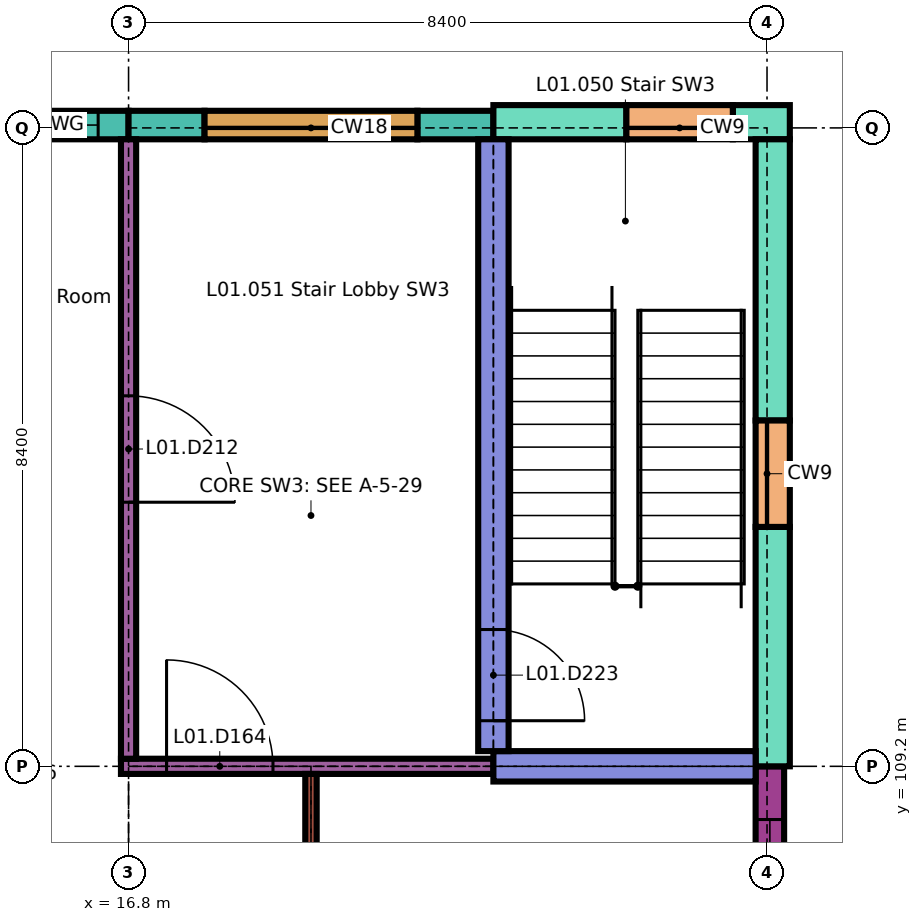
"""IFC4 building model, lengths in metres.
Left out: names, types, materials, properties, quantities, classifications, styles, units other than length and angle.
Written with IfcOpenShell. Run it as: python <this file> out.ifc"""

import sys

from ifc_helpers import new_model, si_unit, direction, frame, frame_2d, origin, place, context, subcontext, project, spatial, rectangle, extrude, element, fill, save


model = new_model("IFC4")
c1 = context("Model", 3, precision=1e-05, world=origin(), true_north=direction((0.0, 1.0)))
c2 = subcontext(c1, "Body", "Model", "MODEL_VIEW")
j1 = project(units=[si_unit("LENGTHUNIT", "METRE"), si_unit("PLANEANGLEUNIT", "RADIAN")], contexts=[c1])
p1 = place(None, origin())
s1 = spatial("IfcSite", under=j1, at=p1, CompositionType="ELEMENT")
p2 = place(p1, origin())
s2 = spatial("IfcBuilding", under=s1, at=p2, CompositionType="ELEMENT")
p3 = place(p2, frame((0.0, 0.0, 4.5)))
s3 = spatial("IfcBuildingStorey", under=s2, at=p3, CompositionType="ELEMENT", Elevation=4.5)
p4 = place(p3, frame((14.2, 117.637, 0.0), z_axis=(0.0, 0.0, 1.0), x_axis=(1.0, 0.0, 0.0)))
e1 = element("IfcWall", 1, at=p4, inside=s3, PredefinedType="SOLIDWALL", context=c2, shape_type="SweptSolid", body=[
    extrude(rectangle(XDim=2.6, YDim=0.375, at=frame_2d((1.3, 0.0))), origin(), (0.0, 0.0, 1.0), 3.45),
])
p5 = place(p4, frame((0.4, 0.0, 0.9)))
e2 = element("IfcOpeningElement", 2, at=p5, cuts=e1, PredefinedType="OPENING", context=c2, shape_type="SweptSolid", body=[
    extrude(rectangle(XDim=1.8, YDim=1.5, at=frame_2d((0.9, 0.75))), frame((0.0, 0.198, 0.0), z_axis=(0.0, -1.0, 0.0), x_axis=(1.0, 0.0, 0.0)), (0.0, 0.0, 1.0), 0.395),
])
for number, where, z_axis, x_axis in (
    (3, (16.8, 117.637, 0.0), (0.0, 0.0, 1.0), (1.0, 0.0, 0.0)),
    (4, (20.6, 117.637, 0.0), (0.0, 0.0, 1.0), (1.0, 0.0, 0.0)),
):
    element("IfcWall", number, at=place(p3, frame(where, z_axis=z_axis, x_axis=x_axis)), inside=s3, PredefinedType="SOLIDWALL", context=c2, shape_type="SweptSolid", body=[
        extrude(rectangle(XDim=1.0, YDim=0.375, at=frame_2d((0.5, 0.0))), origin(), (0.0, 0.0, 1.0), 3.45),
    ])
p6 = place(p3, frame((17.8, 117.637, 0.0), z_axis=(0.0, 0.0, 1.0), x_axis=(1.0, 0.0, 0.0)))
e5 = element("IfcWall", 5, at=p6, inside=s3, PredefinedType="SOLIDWALL", context=c2, shape_type="SweptSolid", body=[
    extrude(rectangle(XDim=2.8, YDim=0.375, at=frame_2d((1.4, 0.0))), origin(), (0.0, 0.0, 1.0), 0.6),
])
p7 = place(p3, frame((21.6, 117.675, 0.0), z_axis=(0.0, 0.0, 1.0), x_axis=(1.0, 0.0, 0.0)))
e6 = element("IfcWall", 6, at=p7, inside=s3, PredefinedType="SOLIDWALL", context=c2, shape_type="SweptSolid", body=[
    extrude(rectangle(XDim=1.75, YDim=0.45, at=frame_2d((0.875, 0.0))), origin(), (0.0, 0.0, 1.0), 3.45),
])
p8 = place(p3, frame((24.75, 117.675, 0.0), z_axis=(0.0, 0.0, 1.0), x_axis=(1.0, 0.0, 0.0)))
e7 = element("IfcWall", 7, at=p8, inside=s3, PredefinedType="SOLIDWALL", context=c2, shape_type="SweptSolid", body=[
    extrude(rectangle(XDim=0.75, YDim=0.45, at=frame_2d((0.375, 0.0))), origin(), (0.0, 0.0, 1.0), 3.45),
])
p9 = place(p3, frame((23.35, 117.675, 0.0), z_axis=(0.0, 0.0, 1.0), x_axis=(1.0, 0.0, 0.0)))
e8 = element("IfcWall", 8, at=p9, inside=s3, PredefinedType="SOLIDWALL", context=c2, shape_type="SweptSolid", body=[
    extrude(rectangle(XDim=1.4, YDim=0.45, at=frame_2d((0.7, 0.0))), origin(), (0.0, 0.0, 1.0), 0.6),
])
p10 = place(p3, frame((25.238, 105.0, 0.0), z_axis=(0.0, 0.0, 1.0), x_axis=(0.0, 1.0, 0.0)))
e9 = element("IfcWall", 9, at=p10, inside=s3, PredefinedType="SOLIDWALL", context=c2, shape_type="SweptSolid", body=[
    extrude(rectangle(XDim=4.2, YDim=0.375, at=frame_2d((2.1, 0.0))), origin(), (0.0, 0.0, 1.0), 3.15),
])
p11 = place(p10, frame((0.7, 0.0, 1.0)))
e10 = element("IfcOpeningElement", 10, at=p11, cuts=e9, PredefinedType="OPENING", context=c2, shape_type="SweptSolid", body=[
    extrude(rectangle(XDim=2.8, YDim=1.2, at=frame_2d((1.4, 0.6))), frame((0.0, 0.198, 0.0), z_axis=(0.0, -1.0, 0.0), x_axis=(1.0, 0.0, 0.0)), (0.0, 0.0, 1.0), 0.395),
])
p12 = place(p3, frame((25.275, 109.2, 0.0), z_axis=(0.0, 0.0, 1.0), x_axis=(0.0, 1.0, 0.0)))
e11 = element("IfcWall", 11, at=p12, inside=s3, PredefinedType="SOLIDWALL", context=c2, shape_type="SweptSolid", body=[
    extrude(rectangle(XDim=3.15, YDim=0.45, at=frame_2d((1.575, 0.0))), origin(), (0.0, 0.0, 1.0), 3.45),
])
p13 = place(p3, frame((25.275, 113.75, 0.0), z_axis=(0.0, 0.0, 1.0), x_axis=(0.0, 1.0, 0.0)))
e12 = element("IfcWall", 12, at=p13, inside=s3, PredefinedType="SOLIDWALL", context=c2, shape_type="SweptSolid", body=[
    extrude(rectangle(XDim=3.7, YDim=0.45, at=frame_2d((1.85, 0.0))), origin(), (0.0, 0.0, 1.0), 3.45),
])
p14 = place(p3, frame((25.275, 112.35, 0.0), z_axis=(0.0, 0.0, 1.0), x_axis=(0.0, 1.0, 0.0)))
e13 = element("IfcWall", 13, at=p14, inside=s3, PredefinedType="SOLIDWALL", context=c2, shape_type="SweptSolid", body=[
    extrude(rectangle(XDim=1.4, YDim=0.45, at=frame_2d((0.7, 0.0))), origin(), (0.0, 0.0, 1.0), 0.6),
])
p15 = place(p3, frame((16.7, 109.2, 0.0), z_axis=(0.0, 0.0, 1.0), x_axis=(1.0, 0.0, 0.0)))
e14 = element("IfcWall", 14, at=p15, inside=s3, PredefinedType="PARTITIONING", context=c2, shape_type="SweptSolid", body=[
    extrude(rectangle(XDim=4.9, YDim=0.2, at=frame_2d((2.45, 0.0))), origin(), (0.0, 0.0, 1.0), 3.45),
])
p16 = place(p15, frame((0.6, 0.0, 0.0)))
e15 = element("IfcOpeningElement", 15, at=p16, cuts=e14, PredefinedType="OPENING", context=c2, shape_type="SweptSolid", body=[
    extrude(rectangle(XDim=1.4, YDim=2.1, at=frame_2d((0.7, 1.05))), frame((0.0, 0.11, 0.0), z_axis=(0.0, -1.0, 0.0), x_axis=(1.0, 0.0, 0.0)), (0.0, 0.0, 1.0), 0.22),
])
p17 = place(p3, frame((21.6, 109.2, 0.0), z_axis=(0.0, 0.0, 1.0), x_axis=(1.0, 0.0, 0.0)))
e16 = element("IfcWall", 16, at=p17, inside=s3, PredefinedType="SHEAR", context=c2, shape_type="SweptSolid", body=[
    extrude(rectangle(XDim=3.45, YDim=0.4, at=frame_2d((1.725, 0.0))), origin(), (0.0, 0.0, 1.0), 3.45),
])
p18 = place(p3, frame((16.8, 109.3, 0.0), z_axis=(0.0, 0.0, 1.0), x_axis=(0.0, 1.0, 0.0)))
e17 = element("IfcWall", 17, at=p18, inside=s3, PredefinedType="PARTITIONING", context=c2, shape_type="SweptSolid", body=[
    extrude(rectangle(XDim=8.15, YDim=0.2, at=frame_2d((4.075, 0.0))), origin(), (0.0, 0.0, 1.0), 3.45),
])
p19 = place(p18, frame((3.375, 0.0, 0.0)))
e18 = element("IfcOpeningElement", 18, at=p19, cuts=e17, PredefinedType="OPENING", context=c2, shape_type="SweptSolid", body=[
    extrude(rectangle(XDim=1.4, YDim=2.1, at=frame_2d((0.7, 1.05))), frame((0.0, 0.11, 0.0), z_axis=(0.0, -1.0, 0.0), x_axis=(1.0, 0.0, 0.0)), (0.0, 0.0, 1.0), 0.22),
])
p20 = place(p3, frame((19.2, 92.488, 0.0), z_axis=(0.0, 0.0, 1.0), x_axis=(0.0, 1.0, 0.0)))
e19 = element("IfcWall", 19, at=p20, inside=s3, PredefinedType="PARTITIONING", context=c2, shape_type="SweptSolid", body=[
    extrude(rectangle(XDim=16.613, YDim=0.15, at=frame_2d((8.306, 0.0))), origin(), (0.0, 0.0, 1.0), 3.45),
])
p21 = place(p20, frame((3.656, 0.0, 0.0)))
e20 = element("IfcOpeningElement", 20, at=p21, cuts=e19, PredefinedType="OPENING", context=c2, shape_type="SweptSolid", body=[
    extrude(rectangle(XDim=1.0, YDim=2.1, at=frame_2d((0.5, 1.05))), frame((0.0, 0.085, 0.0), z_axis=(0.0, -1.0, 0.0), x_axis=(1.0, 0.0, 0.0)), (0.0, 0.0, 1.0), 0.17),
])
p22 = place(p20, frame((9.913, 0.0, 0.0)))
e21 = element("IfcOpeningElement", 21, at=p22, cuts=e19, PredefinedType="OPENING", context=c2, shape_type="SweptSolid", body=[
    extrude(rectangle(XDim=1.0, YDim=2.1, at=frame_2d((0.5, 1.05))), frame((0.0, 0.085, 0.0), z_axis=(0.0, -1.0, 0.0), x_axis=(1.0, 0.0, 0.0)), (0.0, 0.0, 1.0), 0.17),
])
p23 = place(p20, frame((14.062, 0.0, 0.0)))
e22 = element("IfcOpeningElement", 22, at=p23, cuts=e19, PredefinedType="OPENING", context=c2, shape_type="SweptSolid", body=[
    extrude(rectangle(XDim=1.0, YDim=2.1, at=frame_2d((0.5, 1.05))), frame((0.0, 0.085, 0.0), z_axis=(0.0, -1.0, 0.0), x_axis=(1.0, 0.0, 0.0)), (0.0, 0.0, 1.0), 0.17),
])
p24 = place(p3, frame((21.6, 109.4, 0.0), z_axis=(0.0, 0.0, 1.0), x_axis=(0.0, 1.0, 0.0)))
e23 = element("IfcWall", 23, at=p24, inside=s3, PredefinedType="SHEAR", context=c2, shape_type="SweptSolid", body=[
    extrude(rectangle(XDim=8.05, YDim=0.4, at=frame_2d((4.025, 0.0))), origin(), (0.0, 0.0, 1.0), 3.45),
])
p25 = place(p24, frame((0.4, 0.0, 0.0)))
e24 = element("IfcOpeningElement", 24, at=p25, cuts=e23, PredefinedType="OPENING", context=c2, shape_type="SweptSolid", body=[
    extrude(rectangle(XDim=1.2, YDim=2.1, at=frame_2d((0.6, 1.05))), frame((0.0, 0.21, 0.0), z_axis=(0.0, -1.0, 0.0), x_axis=(1.0, 0.0, 0.0)), (0.0, 0.0, 1.0), 0.42),
])
p26 = place(p5, origin())
e25 = element("IfcWindow", 25, at=p26, inside=s3, PartitioningType="DOUBLE_PANEL_VERTICAL", PredefinedType="WINDOW", context=c2, shape_type="SweptSolid", body=[
    extrude(rectangle(XDim=1.8, YDim=1.5, at=frame_2d((0.9, 0.75))), frame((0.0, 0.03, 0.0), z_axis=(0.0, -1.0, 0.0), x_axis=(1.0, 0.0, 0.0)), (0.0, 0.0, 1.0), 0.06),
])
fill(e2, e25)
p27 = place(p11, origin())
e26 = element("IfcWindow", 26, at=p27, inside=s3, PartitioningType="DOUBLE_PANEL_VERTICAL", PredefinedType="WINDOW", context=c2, shape_type="SweptSolid", body=[
    extrude(rectangle(XDim=2.8, YDim=1.2, at=frame_2d((1.4, 0.6))), frame((0.0, 0.03, 0.0), z_axis=(0.0, -1.0, 0.0), x_axis=(1.0, 0.0, 0.0)), (0.0, 0.0, 1.0), 0.06),
])
fill(e10, e26)
p28 = place(p16, origin())
e27 = element("IfcDoor", 27, at=p28, inside=s3, OperationType="SINGLE_SWING_RIGHT", PredefinedType="DOOR", context=c2, shape_type="SweptSolid", body=[
    extrude(rectangle(XDim=1.4, YDim=2.1, at=frame_2d((0.7, 1.05))), frame((0.0, 0.03, 0.0), z_axis=(0.0, -1.0, 0.0), x_axis=(1.0, 0.0, 0.0)), (0.0, 0.0, 1.0), 0.06),
])
fill(e15, e27)
p29 = place(p19, origin())
e28 = element("IfcDoor", 28, at=p29, inside=s3, OperationType="SINGLE_SWING_LEFT", PredefinedType="DOOR", context=c2, shape_type="SweptSolid", body=[
    extrude(rectangle(XDim=1.4, YDim=2.1, at=frame_2d((0.7, 1.05))), frame((0.0, 0.03, 0.0), z_axis=(0.0, -1.0, 0.0), x_axis=(1.0, 0.0, 0.0)), (0.0, 0.0, 1.0), 0.06),
])
fill(e18, e28)
p30 = place(p25, origin())
e29 = element("IfcDoor", 29, at=p30, inside=s3, OperationType="SINGLE_SWING_LEFT", PredefinedType="DOOR", context=c2, shape_type="SweptSolid", body=[
    extrude(rectangle(XDim=1.2, YDim=2.1, at=frame_2d((0.6, 1.05))), frame((0.0, 0.025, 0.0), z_axis=(0.0, -1.0, 0.0), x_axis=(1.0, 0.0, 0.0)), (0.0, 0.0, 1.0), 0.05),
])
fill(e24, e29)
save(model, sys.argv[1])
